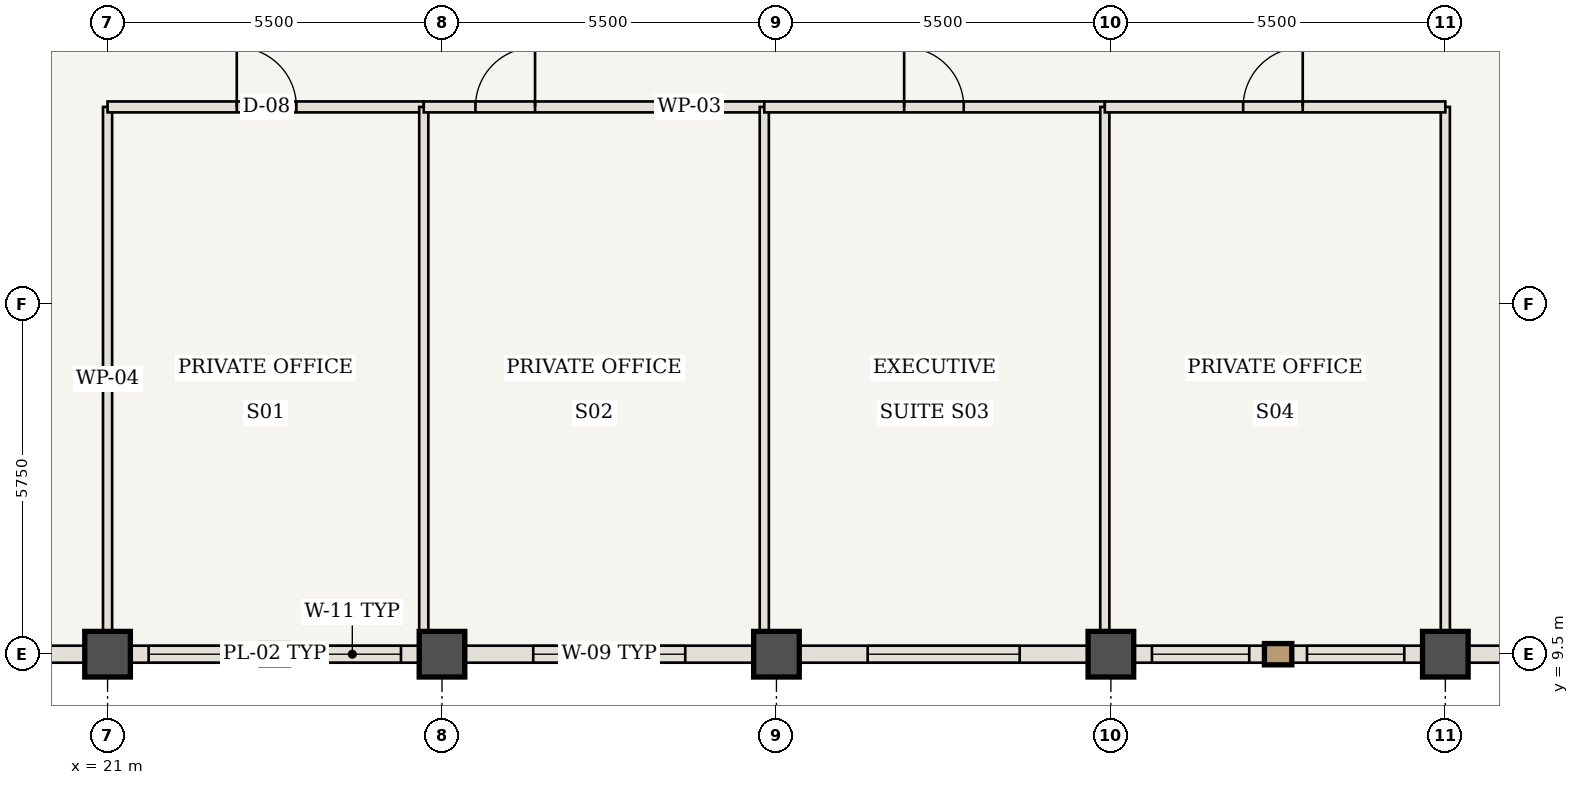
"""IFC4 building model, lengths in metres.
Left out: names, types, materials, properties, quantities, classifications, styles, units other than length and angle.
Written with IfcOpenShell. Run it as: python <this file> out.ifc"""

import sys

from ifc_helpers import new_model, si_unit, direction, frame, frame_2d, origin, origin_2d, place, context, subcontext, project, spatial, rectangle, extrude, element, fill, save


model = new_model("IFC4")
c1 = context("Model", 3, precision=1e-05, world=origin(), true_north=direction((0.0, 1.0)))
c2 = subcontext(c1, "Body", "Model", "MODEL_VIEW")
j1 = project(units=[si_unit("LENGTHUNIT", "METRE"), si_unit("PLANEANGLEUNIT", "RADIAN")], contexts=[c1])
p1 = place(None, origin())
s1 = spatial("IfcSite", under=j1, at=p1, CompositionType="ELEMENT")
p2 = place(p1, origin())
s2 = spatial("IfcBuilding", under=s1, at=p2, CompositionType="ELEMENT")
p3 = place(p2, frame((0.0, 0.0, 262.15)))
s3 = spatial("IfcBuildingStorey", under=s2, at=p3, CompositionType="ELEMENT", Elevation=262.15)
for number, where, z_axis, x_axis in (
    (1, (21.0, 9.5, 0.0), (0.0, 0.0, 1.0), (1.0, 0.0, 0.0)),
    (2, (26.5, 9.5, 0.0), (0.0, 0.0, 1.0), (1.0, 0.0, 0.0)),
    (3, (32.0, 9.5, 0.0), (0.0, 0.0, 1.0), (1.0, 0.0, 0.0)),
    (4, (37.5, 9.5, 0.0), (0.0, 0.0, 1.0), (1.0, 0.0, 0.0)),
    (5, (43.0, 9.5, 0.0), (0.0, 0.0, 1.0), (1.0, 0.0, 0.0)),
):
    element("IfcColumn", number, at=place(p3, frame(where, z_axis=z_axis, x_axis=x_axis)), inside=s3, PredefinedType="COLUMN", context=c2, shape_type="SweptSolid", body=[
        extrude(rectangle(XDim=0.75, YDim=0.75, at=origin_2d()), origin(), (0.0, 0.0, 1.0), 3.85),
    ])
for number, where, z_axis, x_axis in (
    (6, (21.0, 9.56, 0.0), (0.0, 0.0, 1.0), (0.0, 1.0, 0.0)),
    (7, (43.0, 9.56, 0.0), (0.0, 0.0, 1.0), (0.0, 1.0, 0.0)),
):
    element("IfcWall", number, at=place(p3, frame(where, z_axis=z_axis, x_axis=x_axis)), inside=s3, PredefinedType="STANDARD", context=c2, shape_type="SweptSolid", body=[
        extrude(rectangle(XDim=8.94, YDim=0.15, at=frame_2d((4.47, 0.0))), origin(), (0.0, 0.0, 1.0), 3.43),
    ])
p4 = place(p3, frame((21.0, 18.5, 0.0), z_axis=(0.0, 0.0, 1.0), x_axis=(1.0, 0.0, 0.0)))
e8 = element("IfcWall", 8, at=p4, inside=s3, PredefinedType="STANDARD", context=c2, shape_type="SweptSolid", body=[
    extrude(rectangle(XDim=5.2, YDim=0.18, at=frame_2d((2.6, 0.0))), origin(), (0.0, 0.0, 1.0), 3.43),
])
p5 = place(p4, frame((2.125, 0.0, 0.0)))
e9 = element("IfcOpeningElement", 9, at=p5, cuts=e8, PredefinedType="OPENING", context=c2, shape_type="SweptSolid", body=[
    extrude(rectangle(XDim=0.98, YDim=2.2, at=frame_2d((0.49, 1.1))), frame((0.0, 0.1, 0.0), z_axis=(0.0, -1.0, 0.0), x_axis=(1.0, 0.0, 0.0)), (0.0, 0.0, 1.0), 0.2),
])
p6 = place(p3, frame((26.2, 9.56, 0.0), z_axis=(0.0, 0.0, 1.0), x_axis=(0.0, 1.0, 0.0)))
e10 = element("IfcWall", 10, at=p6, inside=s3, PredefinedType="STANDARD", context=c2, shape_type="SweptSolid", body=[
    extrude(rectangle(XDim=8.94, YDim=0.15, at=frame_2d((4.47, 0.0))), origin(), (0.0, 0.0, 1.0), 3.43),
])
p7 = place(p3, frame((26.2, 18.5, 0.0), z_axis=(0.0, 0.0, 1.0), x_axis=(1.0, 0.0, 0.0)))
e11 = element("IfcWall", 11, at=p7, inside=s3, PredefinedType="STANDARD", context=c2, shape_type="SweptSolid", body=[
    extrude(rectangle(XDim=5.6, YDim=0.18, at=frame_2d((2.8, 0.0))), origin(), (0.0, 0.0, 1.0), 3.43),
])
p8 = place(p7, frame((0.85, 0.0, 0.0)))
e12 = element("IfcOpeningElement", 12, at=p8, cuts=e11, PredefinedType="OPENING", context=c2, shape_type="SweptSolid", body=[
    extrude(rectangle(XDim=0.98, YDim=2.2, at=frame_2d((0.49, 1.1))), frame((0.0, 0.1, 0.0), z_axis=(0.0, -1.0, 0.0), x_axis=(1.0, 0.0, 0.0)), (0.0, 0.0, 1.0), 0.2),
])
p9 = place(p3, frame((31.8, 9.56, 0.0), z_axis=(0.0, 0.0, 1.0), x_axis=(0.0, 1.0, 0.0)))
e13 = element("IfcWall", 13, at=p9, inside=s3, PredefinedType="STANDARD", context=c2, shape_type="SweptSolid", body=[
    extrude(rectangle(XDim=8.94, YDim=0.15, at=frame_2d((4.47, 0.0))), origin(), (0.0, 0.0, 1.0), 2.885),
])
p10 = place(p3, frame((31.8, 18.5, 0.0), z_axis=(0.0, 0.0, 1.0), x_axis=(1.0, 0.0, 0.0)))
e14 = element("IfcWall", 14, at=p10, inside=s3, PredefinedType="STANDARD", context=c2, shape_type="SweptSolid", body=[
    extrude(rectangle(XDim=5.6, YDim=0.18, at=frame_2d((2.8, 0.0))), origin(), (0.0, 0.0, 1.0), 3.43),
])
p11 = place(p10, frame((2.3, 0.0, 0.0)))
e15 = element("IfcOpeningElement", 15, at=p11, cuts=e14, PredefinedType="OPENING", context=c2, shape_type="SweptSolid", body=[
    extrude(rectangle(XDim=0.98, YDim=2.2, at=frame_2d((0.49, 1.1))), frame((0.0, 0.1, 0.0), z_axis=(0.0, -1.0, 0.0), x_axis=(1.0, 0.0, 0.0)), (0.0, 0.0, 1.0), 0.2),
])
p12 = place(p3, frame((37.4, 9.56, 0.0), z_axis=(0.0, 0.0, 1.0), x_axis=(0.0, 1.0, 0.0)))
e16 = element("IfcWall", 16, at=p12, inside=s3, PredefinedType="STANDARD", context=c2, shape_type="SweptSolid", body=[
    extrude(rectangle(XDim=8.94, YDim=0.15, at=frame_2d((4.47, 0.0))), origin(), (0.0, 0.0, 1.0), 3.43),
])
p13 = place(p3, frame((37.4, 18.5, 0.0), z_axis=(0.0, 0.0, 1.0), x_axis=(1.0, 0.0, 0.0)))
e17 = element("IfcWall", 17, at=p13, inside=s3, PredefinedType="STANDARD", context=c2, shape_type="SweptSolid", body=[
    extrude(rectangle(XDim=5.6, YDim=0.18, at=frame_2d((2.8, 0.0))), origin(), (0.0, 0.0, 1.0), 3.43),
])
p14 = place(p13, frame((2.275, 0.0, 0.0)))
e18 = element("IfcOpeningElement", 18, at=p14, cuts=e17, PredefinedType="OPENING", context=c2, shape_type="SweptSolid", body=[
    extrude(rectangle(XDim=0.98, YDim=2.2, at=frame_2d((0.49, 1.1))), frame((0.0, 0.1, 0.0), z_axis=(0.0, -1.0, 0.0), x_axis=(1.0, 0.0, 0.0)), (0.0, 0.0, 1.0), 0.2),
])
p15 = place(p3, frame((21.0, 9.5, 0.0), z_axis=(0.0, 0.0, 1.0), x_axis=(-1.0, 0.0, 0.0)))
e19 = element("IfcWall", 19, at=p15, inside=s3, PredefinedType="USERDEFINED", context=c2, shape_type="SweptSolid", body=[
    extrude(rectangle(XDim=5.5, YDim=0.28, at=frame_2d((2.75, 0.0))), origin(), (0.0, 0.0, 1.0), 2.73),
])
p16 = place(p3, frame((26.5, 9.5, 0.0), z_axis=(0.0, 0.0, 1.0), x_axis=(-1.0, 0.0, 0.0)))
e20 = element("IfcWall", 20, at=p16, inside=s3, PredefinedType="USERDEFINED", context=c2, shape_type="SweptSolid", body=[
    extrude(rectangle(XDim=5.5, YDim=0.28, at=frame_2d((2.75, 0.0))), origin(), (0.0, 0.0, 1.0), 2.73),
])
p17 = place(p16, frame((0.675, 0.0, 0.85)))
e21 = element("IfcOpeningElement", 21, at=p17, cuts=e20, PredefinedType="OPENING", context=c2, shape_type="SweptSolid", body=[
    extrude(rectangle(XDim=1.6, YDim=1.68, at=frame_2d((0.8, 0.84))), frame((0.0, 0.15, 0.0), z_axis=(0.0, -1.0, 0.0), x_axis=(1.0, 0.0, 0.0)), (0.0, 0.0, 1.0), 0.3),
])
p18 = place(p16, frame((3.225, 0.0, 0.85)))
e22 = element("IfcOpeningElement", 22, at=p18, cuts=e20, PredefinedType="OPENING", context=c2, shape_type="SweptSolid", body=[
    extrude(rectangle(XDim=1.6, YDim=1.68, at=frame_2d((0.8, 0.84))), frame((0.0, 0.15, 0.0), z_axis=(0.0, -1.0, 0.0), x_axis=(1.0, 0.0, 0.0)), (0.0, 0.0, 1.0), 0.3),
])
p19 = place(p3, frame((32.0, 9.5, 0.0), z_axis=(0.0, 0.0, 1.0), x_axis=(-1.0, 0.0, 0.0)))
e23 = element("IfcWall", 23, at=p19, inside=s3, PredefinedType="USERDEFINED", context=c2, shape_type="SweptSolid", body=[
    extrude(rectangle(XDim=5.5, YDim=0.28, at=frame_2d((2.75, 0.0))), origin(), (0.0, 0.0, 1.0), 2.73),
])
p20 = place(p19, frame((1.5, 0.0, 0.85)))
e24 = element("IfcOpeningElement", 24, at=p20, cuts=e23, PredefinedType="OPENING", context=c2, shape_type="SweptSolid", body=[
    extrude(rectangle(XDim=2.5, YDim=1.68, at=frame_2d((1.25, 0.84))), frame((0.0, 0.15, 0.0), z_axis=(0.0, -1.0, 0.0), x_axis=(1.0, 0.0, 0.0)), (0.0, 0.0, 1.0), 0.3),
])
p21 = place(p3, frame((37.5, 9.5, 0.0), z_axis=(0.0, 0.0, 1.0), x_axis=(-1.0, 0.0, 0.0)))
e25 = element("IfcWall", 25, at=p21, inside=s3, PredefinedType="USERDEFINED", context=c2, shape_type="SweptSolid", body=[
    extrude(rectangle(XDim=5.5, YDim=0.28, at=frame_2d((2.75, 0.0))), origin(), (0.0, 0.0, 1.0), 2.73),
])
p22 = place(p21, frame((1.5, 0.0, 0.85)))
e26 = element("IfcOpeningElement", 26, at=p22, cuts=e25, PredefinedType="OPENING", context=c2, shape_type="SweptSolid", body=[
    extrude(rectangle(XDim=2.5, YDim=1.68, at=frame_2d((1.25, 0.84))), frame((0.0, 0.15, 0.0), z_axis=(0.0, -1.0, 0.0), x_axis=(1.0, 0.0, 0.0)), (0.0, 0.0, 1.0), 0.3),
])
p23 = place(p3, frame((43.0, 9.5, 0.0), z_axis=(0.0, 0.0, 1.0), x_axis=(-1.0, 0.0, 0.0)))
e27 = element("IfcWall", 27, at=p23, inside=s3, PredefinedType="USERDEFINED", context=c2, shape_type="SweptSolid", body=[
    extrude(rectangle(XDim=5.5, YDim=0.28, at=frame_2d((2.75, 0.0))), origin(), (0.0, 0.0, 1.0), 2.73),
])
p24 = place(p23, frame((0.675, 0.0, 0.85)))
e28 = element("IfcOpeningElement", 28, at=p24, cuts=e27, PredefinedType="OPENING", context=c2, shape_type="SweptSolid", body=[
    extrude(rectangle(XDim=1.6, YDim=1.68, at=frame_2d((0.8, 0.84))), frame((0.0, 0.15, 0.0), z_axis=(0.0, -1.0, 0.0), x_axis=(1.0, 0.0, 0.0)), (0.0, 0.0, 1.0), 0.3),
])
p25 = place(p23, frame((3.225, 0.0, 0.85)))
e29 = element("IfcOpeningElement", 29, at=p25, cuts=e27, PredefinedType="OPENING", context=c2, shape_type="SweptSolid", body=[
    extrude(rectangle(XDim=1.6, YDim=1.68, at=frame_2d((0.8, 0.84))), frame((0.0, 0.15, 0.0), z_axis=(0.0, -1.0, 0.0), x_axis=(1.0, 0.0, 0.0)), (0.0, 0.0, 1.0), 0.3),
])
p26 = place(p3, frame((48.5, 9.5, 0.0), z_axis=(0.0, 0.0, 1.0), x_axis=(-1.0, 0.0, 0.0)))
e30 = element("IfcWall", 30, at=p26, inside=s3, PredefinedType="USERDEFINED", context=c2, shape_type="SweptSolid", body=[
    extrude(rectangle(XDim=5.5, YDim=0.28, at=frame_2d((2.75, 0.0))), origin(), (0.0, 0.0, 1.0), 2.73),
])
p27 = place(p5, origin())
e31 = element("IfcDoor", 31, at=p27, inside=s3, OperationType="SINGLE_SWING_LEFT", PredefinedType="DOOR", context=c2, shape_type="SweptSolid", body=[
    extrude(rectangle(XDim=0.98, YDim=2.2, at=frame_2d((0.49, 1.1))), frame((0.0, 0.025, 0.0), z_axis=(0.0, -1.0, 0.0), x_axis=(1.0, 0.0, 0.0)), (0.0, 0.0, 1.0), 0.05),
])
fill(e9, e31)
p28 = place(p8, origin())
e32 = element("IfcDoor", 32, at=p28, inside=s3, OperationType="SINGLE_SWING_RIGHT", PredefinedType="DOOR", context=c2, shape_type="SweptSolid", body=[
    extrude(rectangle(XDim=0.98, YDim=2.2, at=frame_2d((0.49, 1.1))), frame((0.0, 0.025, 0.0), z_axis=(0.0, -1.0, 0.0), x_axis=(1.0, 0.0, 0.0)), (0.0, 0.0, 1.0), 0.05),
])
fill(e12, e32)
p29 = place(p11, origin())
e33 = element("IfcDoor", 33, at=p29, inside=s3, OperationType="SINGLE_SWING_LEFT", PredefinedType="DOOR", context=c2, shape_type="SweptSolid", body=[
    extrude(rectangle(XDim=0.98, YDim=2.2, at=frame_2d((0.49, 1.1))), frame((0.0, 0.025, 0.0), z_axis=(0.0, -1.0, 0.0), x_axis=(1.0, 0.0, 0.0)), (0.0, 0.0, 1.0), 0.05),
])
fill(e15, e33)
p30 = place(p14, origin())
e34 = element("IfcDoor", 34, at=p30, inside=s3, OperationType="SINGLE_SWING_RIGHT", PredefinedType="DOOR", context=c2, shape_type="SweptSolid", body=[
    extrude(rectangle(XDim=0.98, YDim=2.2, at=frame_2d((0.49, 1.1))), frame((0.0, 0.025, 0.0), z_axis=(0.0, -1.0, 0.0), x_axis=(1.0, 0.0, 0.0)), (0.0, 0.0, 1.0), 0.05),
])
fill(e18, e34)
p31 = place(p17, origin())
e35 = element("IfcWindow", 35, at=p31, inside=s3, PartitioningType="SINGLE_PANEL", PredefinedType="WINDOW", context=c2, shape_type="SweptSolid", body=[
    extrude(rectangle(XDim=1.6, YDim=1.68, at=frame_2d((0.8, 0.84))), frame((0.0, 0.03, 0.0), z_axis=(0.0, -1.0, 0.0), x_axis=(1.0, 0.0, 0.0)), (0.0, 0.0, 1.0), 0.06),
])
fill(e21, e35)
p32 = place(p18, origin())
e36 = element("IfcWindow", 36, at=p32, inside=s3, PartitioningType="SINGLE_PANEL", PredefinedType="WINDOW", context=c2, shape_type="SweptSolid", body=[
    extrude(rectangle(XDim=1.6, YDim=1.68, at=frame_2d((0.8, 0.84))), frame((0.0, 0.03, 0.0), z_axis=(0.0, -1.0, 0.0), x_axis=(1.0, 0.0, 0.0)), (0.0, 0.0, 1.0), 0.06),
])
fill(e22, e36)
p33 = place(p20, origin())
e37 = element("IfcWindow", 37, at=p33, inside=s3, PartitioningType="SINGLE_PANEL", PredefinedType="WINDOW", context=c2, shape_type="SweptSolid", body=[
    extrude(rectangle(XDim=2.5, YDim=1.68, at=frame_2d((1.25, 0.84))), frame((0.0, 0.03, 0.0), z_axis=(0.0, -1.0, 0.0), x_axis=(1.0, 0.0, 0.0)), (0.0, 0.0, 1.0), 0.06),
])
fill(e24, e37)
p34 = place(p22, origin())
e38 = element("IfcWindow", 38, at=p34, inside=s3, PartitioningType="SINGLE_PANEL", PredefinedType="WINDOW", context=c2, shape_type="SweptSolid", body=[
    extrude(rectangle(XDim=2.5, YDim=1.68, at=frame_2d((1.25, 0.84))), frame((0.0, 0.03, 0.0), z_axis=(0.0, -1.0, 0.0), x_axis=(1.0, 0.0, 0.0)), (0.0, 0.0, 1.0), 0.06),
])
fill(e26, e38)
p35 = place(p24, origin())
e39 = element("IfcWindow", 39, at=p35, inside=s3, PartitioningType="SINGLE_PANEL", PredefinedType="WINDOW", context=c2, shape_type="SweptSolid", body=[
    extrude(rectangle(XDim=1.6, YDim=1.68, at=frame_2d((0.8, 0.84))), frame((0.0, 0.03, 0.0), z_axis=(0.0, -1.0, 0.0), x_axis=(1.0, 0.0, 0.0)), (0.0, 0.0, 1.0), 0.06),
])
fill(e28, e39)
p36 = place(p25, origin())
e40 = element("IfcWindow", 40, at=p36, inside=s3, PartitioningType="SINGLE_PANEL", PredefinedType="WINDOW", context=c2, shape_type="SweptSolid", body=[
    extrude(rectangle(XDim=1.6, YDim=1.68, at=frame_2d((0.8, 0.84))), frame((0.0, 0.03, 0.0), z_axis=(0.0, -1.0, 0.0), x_axis=(1.0, 0.0, 0.0)), (0.0, 0.0, 1.0), 0.06),
])
fill(e29, e40)
save(model, sys.argv[1])
